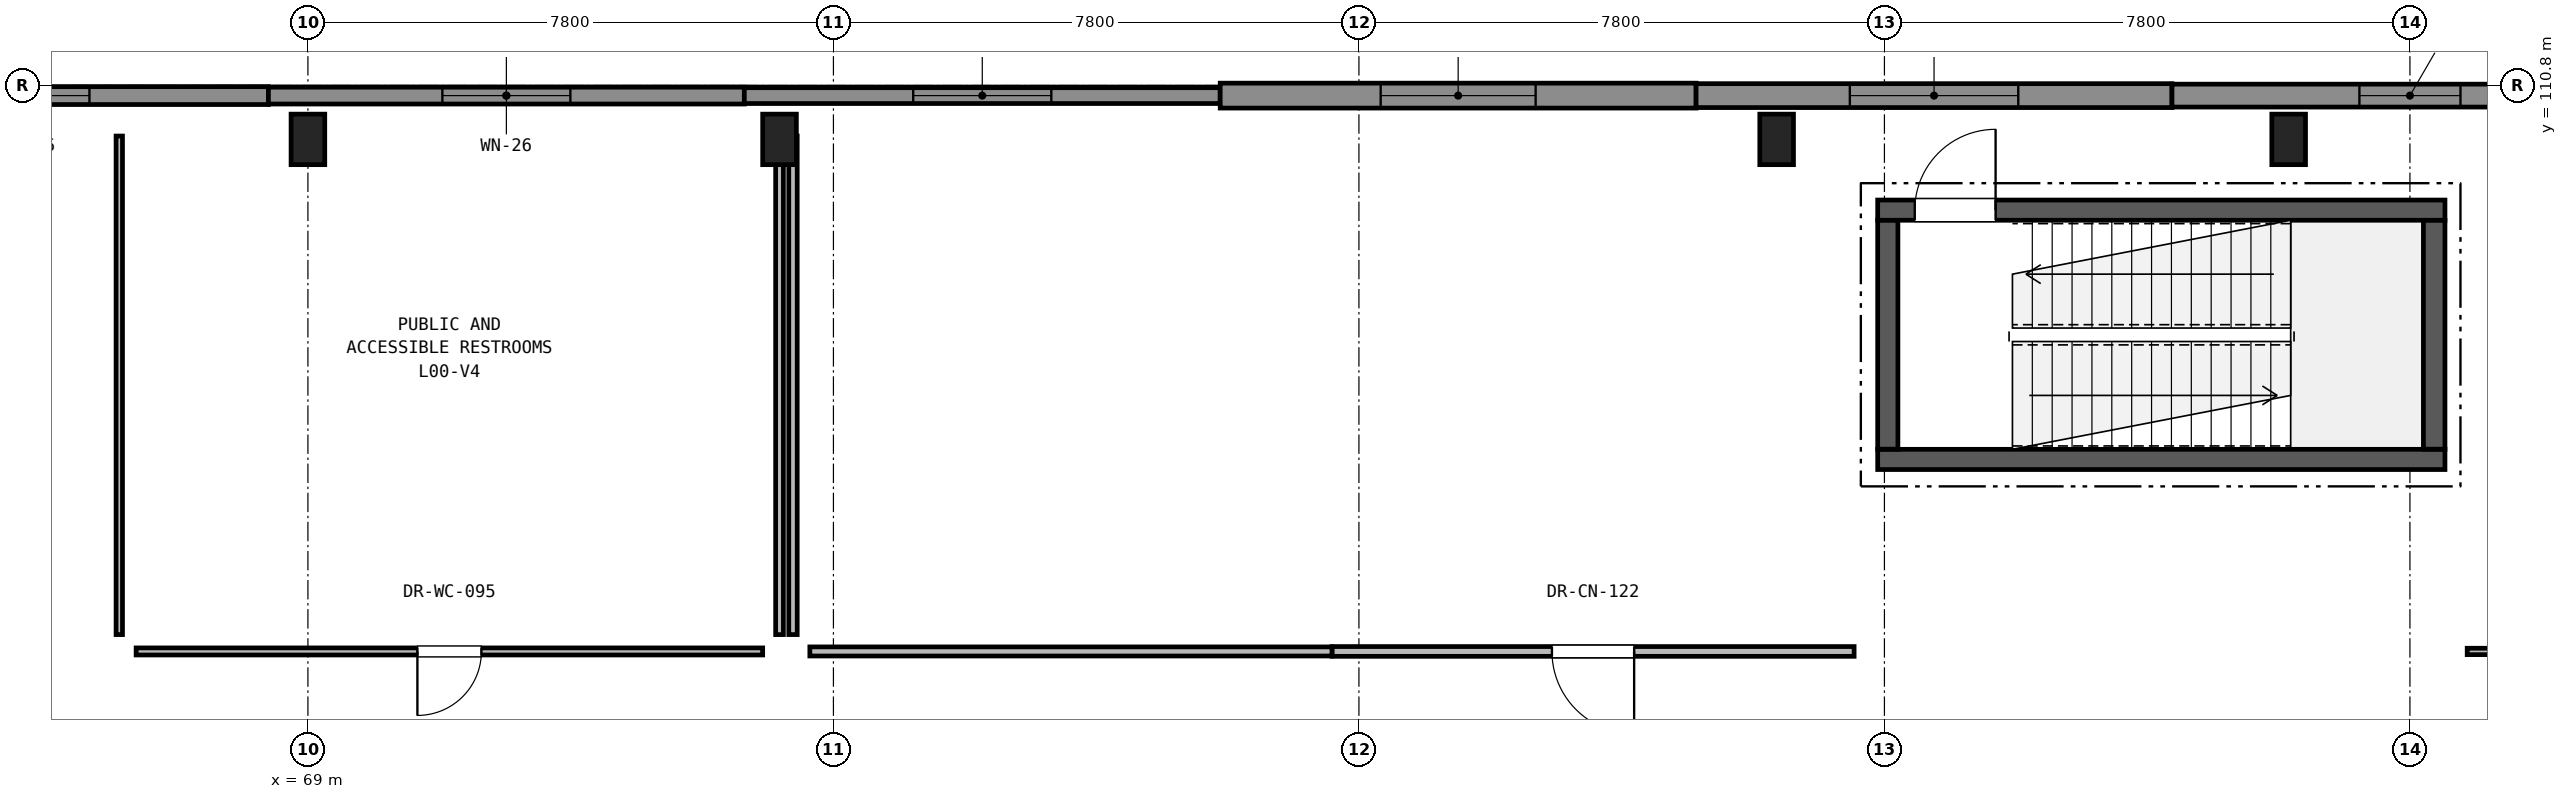
"""IFC4 building model, lengths in metres.
Left out: names, types, materials, properties, quantities, classifications, styles, units other than length and angle.
Written with IfcOpenShell. Run it as: python <this file> out.ifc"""

import sys

from ifc_helpers import new_model, si_unit, direction, frame, frame_2d, origin, origin_2d, place, context, subcontext, project, spatial, rectangle, extrude, element, fill, save


model = new_model("IFC4")
c1 = context("Model", 3, precision=1e-05, world=origin(), true_north=direction((0.0, 1.0)))
c2 = subcontext(c1, "Body", "Model", "MODEL_VIEW")
j1 = project(units=[si_unit("LENGTHUNIT", "METRE"), si_unit("PLANEANGLEUNIT", "RADIAN")], contexts=[c1])
p1 = place(None, origin())
s1 = spatial("IfcSite", under=j1, at=p1, CompositionType="ELEMENT")
p2 = place(p1, origin())
s2 = spatial("IfcBuilding", under=s1, at=p2, CompositionType="ELEMENT")
p3 = place(p2, origin())
s3 = spatial("IfcBuildingStorey", under=s2, at=p3, CompositionType="ELEMENT", Elevation=0.0)
for number, where, z_axis, x_axis in (
    (1, (69.0, 110.0, 0.0), (0.0, 0.0, 1.0), (1.0, 0.0, 0.0)),
    (2, (76.0, 110.0, 0.0), (0.0, 0.0, 1.0), (1.0, 0.0, 0.0)),
    (3, (90.8, 110.0, 0.0), (0.0, 0.0, 1.0), (1.0, 0.0, 0.0)),
    (4, (98.4, 110.0, 0.0), (0.0, 0.0, 1.0), (1.0, 0.0, 0.0)),
):
    element("IfcColumn", number, at=place(p3, frame(where, z_axis=z_axis, x_axis=x_axis)), inside=s3, PredefinedType="COLUMN", context=c2, shape_type="SweptSolid", body=[
        extrude(rectangle(XDim=0.5, YDim=0.75, at=origin_2d()), origin(), (0.0, 0.0, 1.0), 5.1),
    ])
p4 = place(p3, frame((61.35, 110.65, 0.0), z_axis=(0.0, 0.0, 1.0), x_axis=(1.0, 0.0, 0.0)))
e5 = element("IfcWall", 5, at=p4, inside=s3, PredefinedType="SOLIDWALL", context=c2, shape_type="SweptSolid", body=[
    extrude(rectangle(XDim=7.063, YDim=0.265, at=frame_2d((3.532, 0.0))), origin(), (0.0, 0.0, 1.0), 4.81),
])
p5 = place(p4, frame((2.657, 0.0, 0.9)))
e6 = element("IfcOpeningElement", 6, at=p5, cuts=e5, PredefinedType="OPENING", context=c2, shape_type="SweptSolid", body=[
    extrude(rectangle(XDim=1.75, YDim=2.0, at=frame_2d((0.875, 1.0))), frame((0.0, 0.142, 0.0), z_axis=(0.0, -1.0, 0.0), x_axis=(1.0, 0.0, 0.0)), (0.0, 0.0, 1.0), 0.285),
])
p6 = place(p3, frame((68.414, 110.65, 0.0), z_axis=(0.0, 0.0, 1.0), x_axis=(1.0, 0.0, 0.0)))
e7 = element("IfcWall", 7, at=p6, inside=s3, PredefinedType="SOLIDWALL", context=c2, shape_type="SweptSolid", body=[
    extrude(rectangle(XDim=7.064, YDim=0.25, at=frame_2d((3.532, 0.0))), origin(), (0.0, 0.0, 1.0), 4.81),
])
p7 = place(p6, frame((2.582, 0.0, 0.9)))
e8 = element("IfcOpeningElement", 8, at=p7, cuts=e7, PredefinedType="OPENING", context=c2, shape_type="SweptSolid", body=[
    extrude(rectangle(XDim=1.9, YDim=2.0, at=frame_2d((0.95, 1.0))), frame((0.0, 0.135, 0.0), z_axis=(0.0, -1.0, 0.0), x_axis=(1.0, 0.0, 0.0)), (0.0, 0.0, 1.0), 0.27),
])
p8 = place(p3, frame((75.477, 110.65, 0.0), z_axis=(0.0, 0.0, 1.0), x_axis=(1.0, 0.0, 0.0)))
e9 = element("IfcWall", 9, at=p8, inside=s3, PredefinedType="SOLIDWALL", context=c2, shape_type="SweptSolid", body=[
    extrude(rectangle(XDim=7.064, YDim=0.235, at=frame_2d((3.532, 0.0))), origin(), (0.0, 0.0, 1.0), 4.81),
])
p9 = place(p8, frame((2.507, 0.0, 0.9)))
e10 = element("IfcOpeningElement", 10, at=p9, cuts=e9, PredefinedType="OPENING", context=c2, shape_type="SweptSolid", body=[
    extrude(rectangle(XDim=2.05, YDim=2.0, at=frame_2d((1.025, 1.0))), frame((0.0, 0.127, 0.0), z_axis=(0.0, -1.0, 0.0), x_axis=(1.0, 0.0, 0.0)), (0.0, 0.0, 1.0), 0.255),
])
p10 = place(p3, frame((82.541, 110.65, 0.0), z_axis=(0.0, 0.0, 1.0), x_axis=(1.0, 0.0, 0.0)))
e11 = element("IfcWall", 11, at=p10, inside=s3, PredefinedType="SOLIDWALL", context=c2, shape_type="SweptSolid", body=[
    extrude(rectangle(XDim=7.063, YDim=0.37, at=frame_2d((3.532, 0.0))), origin(), (0.0, 0.0, 1.0), 4.81),
])
p11 = place(p10, frame((2.382, 0.0, 0.9)))
e12 = element("IfcOpeningElement", 12, at=p11, cuts=e11, PredefinedType="OPENING", context=c2, shape_type="SweptSolid", body=[
    extrude(rectangle(XDim=2.3, YDim=2.0, at=frame_2d((1.15, 1.0))), frame((0.0, 0.195, 0.0), z_axis=(0.0, -1.0, 0.0), x_axis=(1.0, 0.0, 0.0)), (0.0, 0.0, 1.0), 0.39),
])
p12 = place(p3, frame((89.604, 110.65, 0.0), z_axis=(0.0, 0.0, 1.0), x_axis=(1.0, 0.0, 0.0)))
e13 = element("IfcWall", 13, at=p12, inside=s3, PredefinedType="SOLIDWALL", context=c2, shape_type="SweptSolid", body=[
    extrude(rectangle(XDim=7.064, YDim=0.355, at=frame_2d((3.532, 0.0))), origin(), (0.0, 0.0, 1.0), 4.81),
])
p13 = place(p12, frame((2.282, 0.0, 0.9)))
e14 = element("IfcOpeningElement", 14, at=p13, cuts=e13, PredefinedType="OPENING", context=c2, shape_type="SweptSolid", body=[
    extrude(rectangle(XDim=2.5, YDim=2.0, at=frame_2d((1.25, 1.0))), frame((0.0, 0.188, 0.0), z_axis=(0.0, -1.0, 0.0), x_axis=(1.0, 0.0, 0.0)), (0.0, 0.0, 1.0), 0.375),
])
p14 = place(p3, frame((96.668, 110.65, 0.0), z_axis=(0.0, 0.0, 1.0), x_axis=(1.0, 0.0, 0.0)))
e15 = element("IfcWall", 15, at=p14, inside=s3, PredefinedType="SOLIDWALL", context=c2, shape_type="SweptSolid", body=[
    extrude(rectangle(XDim=7.063, YDim=0.34, at=frame_2d((3.532, 0.0))), origin(), (0.0, 0.0, 1.0), 4.81),
])
p15 = place(p14, frame((2.782, 0.0, 0.9)))
e16 = element("IfcOpeningElement", 16, at=p15, cuts=e15, PredefinedType="OPENING", context=c2, shape_type="SweptSolid", body=[
    extrude(rectangle(XDim=1.5, YDim=2.2, at=frame_2d((0.75, 1.1))), frame((0.0, 0.18, 0.0), z_axis=(0.0, -1.0, 0.0), x_axis=(1.0, 0.0, 0.0)), (0.0, 0.0, 1.0), 0.36),
])
p16 = place(p3, frame((92.3, 105.25, 0.0), z_axis=(0.0, 0.0, 1.0), x_axis=(1.0, 0.0, 0.0)))
e17 = element("IfcWall", 17, at=p16, inside=s3, PredefinedType="SHEAR", context=c2, shape_type="SweptSolid", body=[
    extrude(rectangle(XDim=8.42, YDim=0.3, at=frame_2d((4.21, 0.0))), origin(), (0.0, 0.0, 1.0), 4.81),
])
p17 = place(p3, frame((92.3, 108.95, 0.0), z_axis=(0.0, 0.0, 1.0), x_axis=(1.0, 0.0, 0.0)))
e18 = element("IfcWall", 18, at=p17, inside=s3, PredefinedType="SHEAR", context=c2, shape_type="SweptSolid", body=[
    extrude(rectangle(XDim=8.42, YDim=0.3, at=frame_2d((4.21, 0.0))), origin(), (0.0, 0.0, 1.0), 4.81),
])
p18 = place(p17, frame((0.55, 0.0, 0.0)))
e19 = element("IfcOpeningElement", 19, at=p18, cuts=e18, PredefinedType="OPENING", context=c2, shape_type="SweptSolid", body=[
    extrude(rectangle(XDim=1.2, YDim=2.2, at=frame_2d((0.6, 1.1))), frame((0.0, 0.16, 0.0), z_axis=(0.0, -1.0, 0.0), x_axis=(1.0, 0.0, 0.0)), (0.0, 0.0, 1.0), 0.32),
])
p19 = place(p3, frame((92.45, 105.402, 0.0), z_axis=(0.0, 0.0, 1.0), x_axis=(0.0, 1.0, 0.0)))
e20 = element("IfcWall", 20, at=p19, inside=s3, PredefinedType="SHEAR", context=c2, shape_type="SweptSolid", body=[
    extrude(rectangle(XDim=3.396, YDim=0.3, at=frame_2d((1.698, 0.0))), origin(), (0.0, 0.0, 1.0), 4.81),
])
p20 = place(p3, frame((100.56, 105.402, 0.0), z_axis=(0.0, 0.0, 1.0), x_axis=(0.0, 1.0, 0.0)))
e21 = element("IfcWall", 21, at=p20, inside=s3, PredefinedType="SHEAR", context=c2, shape_type="SweptSolid", body=[
    extrude(rectangle(XDim=3.396, YDim=0.32, at=frame_2d((1.698, 0.0))), origin(), (0.0, 0.0, 1.0), 4.81),
])
p21 = place(p3, frame((76.0, 110.05, 0.0), z_axis=(0.0, 0.0, 1.0), x_axis=(0.0, -1.0, 0.0)))
e22 = element("IfcWall", 22, at=p21, inside=s3, PredefinedType="PARTITIONING", context=c2, shape_type="SweptSolid", body=[
    extrude(rectangle(XDim=7.4, YDim=0.115, at=frame_2d((3.7, 0.0))), origin(), (0.0, 0.0, 1.0), 4.01),
])
p22 = place(p3, frame((75.75, 102.4, 0.0), z_axis=(0.0, 0.0, 1.0), x_axis=(-1.0, 0.0, 0.0)))
e23 = element("IfcWall", 23, at=p22, inside=s3, PredefinedType="PARTITIONING", context=c2, shape_type="SweptSolid", body=[
    extrude(rectangle(XDim=9.3, YDim=0.105, at=frame_2d((4.65, 0.0))), origin(), (0.0, 0.0, 1.0), 4.01),
])
p23 = place(p22, frame((4.175, 0.0, 0.0)))
e24 = element("IfcOpeningElement", 24, at=p23, cuts=e23, PredefinedType="OPENING", context=c2, shape_type="SweptSolid", body=[
    extrude(rectangle(XDim=0.95, YDim=2.15, at=frame_2d((0.475, 1.075))), frame((0.0, 0.062, 0.0), z_axis=(0.0, -1.0, 0.0), x_axis=(1.0, 0.0, 0.0)), (0.0, 0.0, 1.0), 0.125),
])
p24 = place(p3, frame((66.2, 102.65, 0.0), z_axis=(0.0, 0.0, 1.0), x_axis=(0.0, 1.0, 0.0)))
e25 = element("IfcWall", 25, at=p24, inside=s3, PredefinedType="PARTITIONING", context=c2, shape_type="SweptSolid", body=[
    extrude(rectangle(XDim=7.4, YDim=0.095, at=frame_2d((3.7, 0.0))), origin(), (0.0, 0.0, 1.0), 4.16),
])
p25 = place(p3, frame((91.95, 102.4, 0.0), z_axis=(0.0, 0.0, 1.0), x_axis=(-1.0, 0.0, 0.0)))
e26 = element("IfcWall", 26, at=p25, inside=s3, PredefinedType="PARTITIONING", context=c2, shape_type="SweptSolid", body=[
    extrude(rectangle(XDim=7.75, YDim=0.145, at=frame_2d((3.875, 0.0))), origin(), (0.0, 0.0, 1.0), 4.11),
])
p26 = place(p25, frame((3.265, 0.0, 0.0)))
e27 = element("IfcOpeningElement", 27, at=p26, cuts=e26, PredefinedType="OPENING", context=c2, shape_type="SweptSolid", body=[
    extrude(rectangle(XDim=1.22, YDim=2.2, at=frame_2d((0.61, 1.1))), frame((0.0, 0.083, 0.0), z_axis=(0.0, -1.0, 0.0), x_axis=(1.0, 0.0, 0.0)), (0.0, 0.0, 1.0), 0.165),
])
p27 = place(p3, frame((84.2, 102.4, 0.0), z_axis=(0.0, 0.0, 1.0), x_axis=(-1.0, 0.0, 0.0)))
e28 = element("IfcWall", 28, at=p27, inside=s3, PredefinedType="PARTITIONING", context=c2, shape_type="SweptSolid", body=[
    extrude(rectangle(XDim=7.75, YDim=0.135, at=frame_2d((3.875, 0.0))), origin(), (0.0, 0.0, 1.0), 4.81),
])
p28 = place(p3, frame((76.2, 102.65, 0.0), z_axis=(0.0, 0.0, 1.0), x_axis=(0.0, 1.0, 0.0)))
e29 = element("IfcWall", 29, at=p28, inside=s3, PredefinedType="PARTITIONING", context=c2, shape_type="SweptSolid", body=[
    extrude(rectangle(XDim=7.4, YDim=0.125, at=frame_2d((3.7, 0.0))), origin(), (0.0, 0.0, 1.0), 4.01),
])
p29 = place(p3, frame((106.483, 102.4, 0.0), z_axis=(0.0, 0.0, 1.0), x_axis=(-1.0, 0.0, 0.0)))
e30 = element("IfcWall", 30, at=p29, inside=s3, PredefinedType="PARTITIONING", context=c2, shape_type="SweptSolid", body=[
    extrude(rectangle(XDim=5.433, YDim=0.095, at=frame_2d((2.716, 0.0))), origin(), (0.0, 0.0, 1.0), 4.06),
])
p30 = place(p5, origin())
e31 = element("IfcWindow", 31, at=p30, inside=s3, PartitioningType="SINGLE_PANEL", PredefinedType="WINDOW", context=c2, shape_type="SweptSolid", body=[
    extrude(rectangle(XDim=1.75, YDim=2.0, at=frame_2d((0.875, 1.0))), frame((0.0, 0.03, 0.0), z_axis=(0.0, -1.0, 0.0), x_axis=(1.0, 0.0, 0.0)), (0.0, 0.0, 1.0), 0.06),
])
fill(e6, e31)
p31 = place(p7, origin())
e32 = element("IfcWindow", 32, at=p31, inside=s3, PartitioningType="SINGLE_PANEL", PredefinedType="WINDOW", context=c2, shape_type="SweptSolid", body=[
    extrude(rectangle(XDim=1.9, YDim=2.0, at=frame_2d((0.95, 1.0))), frame((0.0, 0.03, 0.0), z_axis=(0.0, -1.0, 0.0), x_axis=(1.0, 0.0, 0.0)), (0.0, 0.0, 1.0), 0.06),
])
fill(e8, e32)
p32 = place(p9, origin())
e33 = element("IfcWindow", 33, at=p32, inside=s3, PartitioningType="SINGLE_PANEL", PredefinedType="WINDOW", context=c2, shape_type="SweptSolid", body=[
    extrude(rectangle(XDim=2.05, YDim=2.0, at=frame_2d((1.025, 1.0))), frame((0.0, 0.03, 0.0), z_axis=(0.0, -1.0, 0.0), x_axis=(1.0, 0.0, 0.0)), (0.0, 0.0, 1.0), 0.06),
])
fill(e10, e33)
p33 = place(p11, origin())
e34 = element("IfcWindow", 34, at=p33, inside=s3, PartitioningType="SINGLE_PANEL", PredefinedType="WINDOW", context=c2, shape_type="SweptSolid", body=[
    extrude(rectangle(XDim=2.3, YDim=2.0, at=frame_2d((1.15, 1.0))), frame((0.0, 0.03, 0.0), z_axis=(0.0, -1.0, 0.0), x_axis=(1.0, 0.0, 0.0)), (0.0, 0.0, 1.0), 0.06),
])
fill(e12, e34)
p34 = place(p13, origin())
e35 = element("IfcWindow", 35, at=p34, inside=s3, PartitioningType="SINGLE_PANEL", PredefinedType="WINDOW", context=c2, shape_type="SweptSolid", body=[
    extrude(rectangle(XDim=2.5, YDim=2.0, at=frame_2d((1.25, 1.0))), frame((0.0, 0.03, 0.0), z_axis=(0.0, -1.0, 0.0), x_axis=(1.0, 0.0, 0.0)), (0.0, 0.0, 1.0), 0.06),
])
fill(e14, e35)
p35 = place(p15, origin())
e36 = element("IfcWindow", 36, at=p35, inside=s3, PartitioningType="SINGLE_PANEL", PredefinedType="WINDOW", context=c2, shape_type="SweptSolid", body=[
    extrude(rectangle(XDim=1.5, YDim=2.2, at=frame_2d((0.75, 1.1))), frame((0.0, 0.03, 0.0), z_axis=(0.0, -1.0, 0.0), x_axis=(1.0, 0.0, 0.0)), (0.0, 0.0, 1.0), 0.06),
])
fill(e16, e36)
p36 = place(p18, origin())
e37 = element("IfcDoor", 37, at=p36, inside=s3, OperationType="SINGLE_SWING_RIGHT", PredefinedType="DOOR", context=c2, shape_type="SweptSolid", body=[
    extrude(rectangle(XDim=1.2, YDim=2.2, at=frame_2d((0.6, 1.1))), frame((0.0, 0.025, 0.0), z_axis=(0.0, -1.0, 0.0), x_axis=(1.0, 0.0, 0.0)), (0.0, 0.0, 1.0), 0.05),
])
fill(e19, e37)
p37 = place(p23, origin())
e38 = element("IfcDoor", 38, at=p37, inside=s3, OperationType="SINGLE_SWING_RIGHT", PredefinedType="DOOR", context=c2, shape_type="SweptSolid", body=[
    extrude(rectangle(XDim=0.95, YDim=2.15, at=frame_2d((0.475, 1.075))), frame((0.0, 0.025, 0.0), z_axis=(0.0, -1.0, 0.0), x_axis=(1.0, 0.0, 0.0)), (0.0, 0.0, 1.0), 0.05),
])
fill(e24, e38)
p38 = place(p26, origin())
e39 = element("IfcDoor", 39, at=p38, inside=s3, OperationType="SINGLE_SWING_LEFT", PredefinedType="DOOR", context=c2, shape_type="SweptSolid", body=[
    extrude(rectangle(XDim=1.22, YDim=2.2, at=frame_2d((0.61, 1.1))), frame((0.0, 0.025, 0.0), z_axis=(0.0, -1.0, 0.0), x_axis=(1.0, 0.0, 0.0)), (0.0, 0.0, 1.0), 0.05),
])
fill(e27, e39)
save(model, sys.argv[1])
